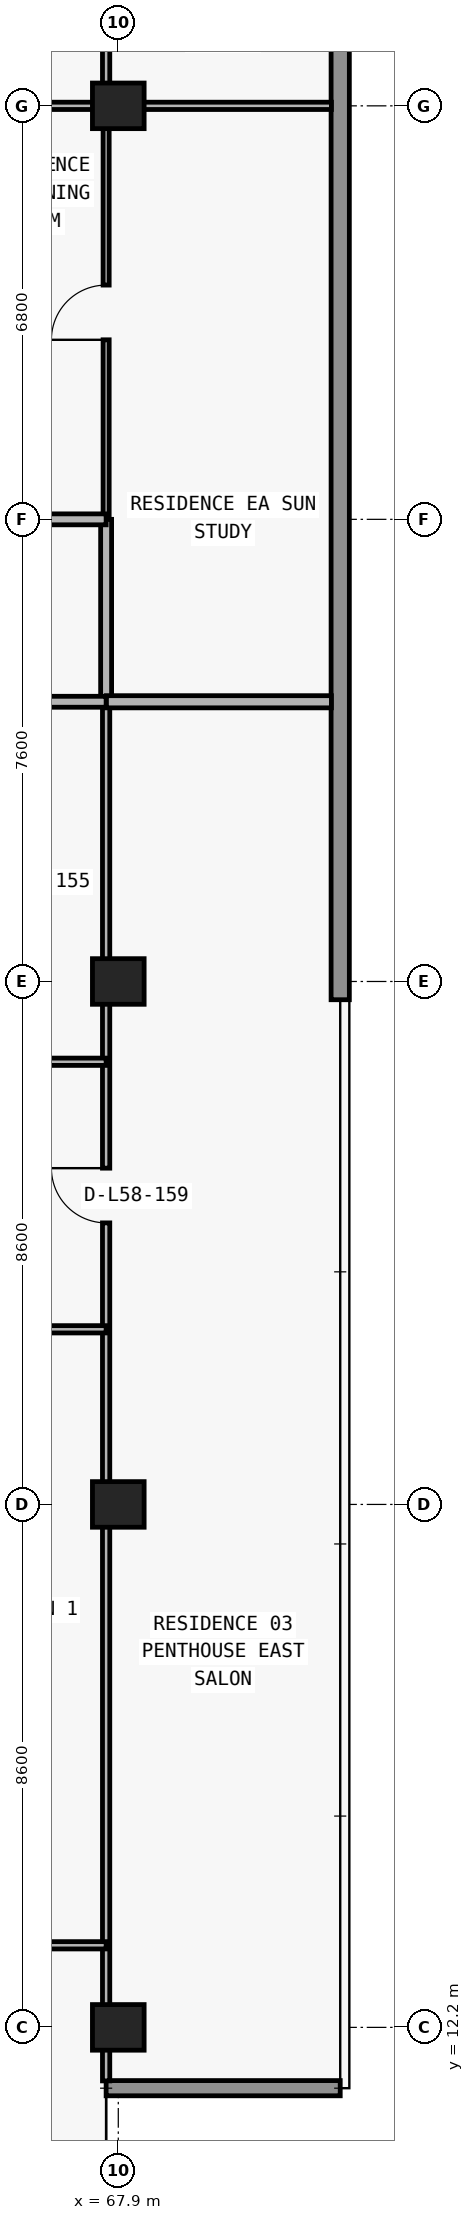
"""IFC4 building model, lengths in metres.
Left out: names, types, materials, properties, quantities, classifications, styles, units other than length and angle.
Written with IfcOpenShell. Run it as: python <this file> out.ifc"""

import sys

from ifc_helpers import new_model, si_unit, direction, frame, frame_2d, origin, origin_2d, place, context, subcontext, project, spatial, rectangle, extrude, element, fill, save


model = new_model("IFC4")
c1 = context("Model", 3, precision=1e-05, world=origin(), true_north=direction((0.0, 1.0)))
c2 = subcontext(c1, "Body", "Model", "MODEL_VIEW")
j1 = project(units=[si_unit("LENGTHUNIT", "METRE"), si_unit("PLANEANGLEUNIT", "RADIAN")], contexts=[c1])
p1 = place(None, origin())
s1 = spatial("IfcSite", under=j1, at=p1, CompositionType="ELEMENT")
p2 = place(p1, origin())
s2 = spatial("IfcBuilding", under=s1, at=p2, CompositionType="ELEMENT")
p3 = place(p2, frame((0.0, 0.0, 208.2)))
s3 = spatial("IfcBuildingStorey", under=s2, at=p3, CompositionType="ELEMENT", Elevation=208.2)
for number, where, z_axis, x_axis in (
    (1, (67.9, 12.2, 0.0), (0.0, 0.0, 1.0), (1.0, 0.0, 0.0)),
    (2, (67.9, 20.8, 0.0), (0.0, 0.0, 1.0), (1.0, 0.0, 0.0)),
    (3, (67.9, 29.4, 0.0), (0.0, 0.0, 1.0), (1.0, 0.0, 0.0)),
    (4, (67.9, 43.8, 0.0), (0.0, 0.0, 1.0), (1.0, 0.0, 0.0)),
):
    element("IfcColumn", number, at=place(p3, frame(where, z_axis=z_axis, x_axis=x_axis)), inside=s3, PredefinedType="COLUMN", context=c2, shape_type="SweptSolid", body=[
        extrude(rectangle(XDim=0.85, YDim=0.75, at=origin_2d()), origin(), (0.0, 0.0, 1.0), 3.05),
    ])
p4 = place(p3, frame((67.7, 11.2, 0.0), z_axis=(0.0, 0.0, 1.0), x_axis=(1.0, 0.0, 0.0)))
e5 = element("IfcWall", 5, at=p4, inside=s3, PredefinedType="ELEMENTEDWALL", context=c2, shape_type="SweptSolid", body=[
    extrude(rectangle(XDim=3.85, YDim=0.25, at=frame_2d((1.925, 0.0))), origin(), (0.0, 0.0, 1.0), 3.05),
])
p5 = place(p3, frame((71.55, 47.0, 0.0), z_axis=(0.0, 0.0, 1.0), x_axis=(0.0, -1.0, 0.0)))
e6 = element("IfcWall", 6, at=p5, inside=s3, PredefinedType="STANDARD", context=c2, shape_type="SweptSolid", body=[
    extrude(rectangle(XDim=17.9, YDim=0.3, at=frame_2d((8.95, 0.0))), origin(), (0.0, 0.0, 1.0), 3.05),
])
p6 = place(p3, frame((67.7, 11.32, 0.0), z_axis=(0.0, 0.0, 1.0), x_axis=(0.0, 1.0, 0.0)))
e7 = element("IfcWall", 7, at=p6, inside=s3, PredefinedType="PARTITIONING", context=c2, shape_type="SweptSolid", body=[
    extrude(rectangle(XDim=22.68, YDim=0.12, at=frame_2d((11.34, 0.0))), origin(), (0.0, 0.0, 1.0), 2.263),
])
p7 = place(p6, frame((14.11, 0.0, 0.0)))
e8 = element("IfcOpeningElement", 8, at=p7, cuts=e7, PredefinedType="OPENING", context=c2, shape_type="SweptSolid", body=[
    extrude(rectangle(XDim=0.9, YDim=2.15, at=frame_2d((0.45, 1.075))), frame((0.0, 0.07, 0.0), z_axis=(0.0, -1.0, 0.0), x_axis=(1.0, 0.0, 0.0)), (0.0, 0.0, 1.0), 0.14),
])
p8 = place(p3, frame((67.7, 34.005, 0.0), z_axis=(0.0, 0.0, 1.0), x_axis=(0.0, 1.0, 0.0)))
e9 = element("IfcWall", 9, at=p8, inside=s3, PredefinedType="PARTITIONING", context=c2, shape_type="SweptSolid", body=[
    extrude(rectangle(XDim=2.995, YDim=0.18, at=frame_2d((1.498, 0.0))), origin(), (0.0, 0.0, 1.0), 2.263),
])
p9 = place(p3, frame((67.7, 37.005, 0.0), z_axis=(0.0, 0.0, 1.0), x_axis=(0.0, 1.0, 0.0)))
e10 = element("IfcWall", 10, at=p9, inside=s3, PredefinedType="MOVABLE", context=c2, shape_type="SweptSolid", body=[
    extrude(rectangle(XDim=6.795, YDim=0.1, at=frame_2d((3.397, 0.0))), origin(), (0.0, 0.0, 1.0), 2.263),
])
p10 = place(p9, frame((2.948, 0.0, 0.0)))
e11 = element("IfcOpeningElement", 11, at=p10, cuts=e10, PredefinedType="OPENING", context=c2, shape_type="SweptSolid", body=[
    extrude(rectangle(XDim=0.9, YDim=2.15, at=frame_2d((0.45, 1.075))), frame((0.0, 0.06, 0.0), z_axis=(0.0, -1.0, 0.0), x_axis=(1.0, 0.0, 0.0)), (0.0, 0.0, 1.0), 0.12),
])
p11 = place(p3, frame((67.7, 43.805, 0.0), z_axis=(0.0, 0.0, 1.0), x_axis=(0.0, 1.0, 0.0)))
e12 = element("IfcWall", 12, at=p11, inside=s3, PredefinedType="PARTITIONING", context=c2, shape_type="SweptSolid", body=[
    extrude(rectangle(XDim=3.075, YDim=0.12, at=frame_2d((1.538, 0.0))), origin(), (0.0, 0.0, 1.0), 3.05),
])
p12 = place(p11, frame((1.087, 0.0, 0.0)))
e13 = element("IfcOpeningElement", 13, at=p12, cuts=e12, PredefinedType="OPENING", context=c2, shape_type="SweptSolid", body=[
    extrude(rectangle(XDim=0.9, YDim=2.15, at=frame_2d((0.45, 1.075))), frame((0.0, 0.07, 0.0), z_axis=(0.0, -1.0, 0.0), x_axis=(1.0, 0.0, 0.0)), (0.0, 0.0, 1.0), 0.14),
])
p13 = place(p3, frame((59.5, 13.55, 0.0), z_axis=(0.0, 0.0, 1.0), x_axis=(1.0, 0.0, 0.0)))
e14 = element("IfcWall", 14, at=p13, inside=s3, PredefinedType="PARTITIONING", context=c2, shape_type="SweptSolid", body=[
    extrude(rectangle(XDim=8.2, YDim=0.12, at=frame_2d((4.1, 0.0))), origin(), (0.0, 0.0, 1.0), 3.05),
])
p14 = place(p13, frame((3.65, 0.0, 0.0)))
e15 = element("IfcOpeningElement", 15, at=p14, cuts=e14, PredefinedType="OPENING", context=c2, shape_type="SweptSolid", body=[
    extrude(rectangle(XDim=0.9, YDim=2.15, at=frame_2d((0.45, 1.075))), frame((0.0, 0.07, 0.0), z_axis=(0.0, -1.0, 0.0), x_axis=(1.0, 0.0, 0.0)), (0.0, 0.0, 1.0), 0.14),
])
p15 = place(p3, frame((59.505, 23.68, 0.0), z_axis=(0.0, 0.0, 1.0), x_axis=(1.0, 0.0, 0.0)))
e16 = element("IfcWall", 16, at=p15, inside=s3, PredefinedType="PARTITIONING", context=c2, shape_type="SweptSolid", body=[
    extrude(rectangle(XDim=8.195, YDim=0.12, at=frame_2d((4.098, 0.0))), origin(), (0.0, 0.0, 1.0), 3.05),
])
p16 = place(p15, frame((3.647, 0.0, 0.0)))
e17 = element("IfcOpeningElement", 17, at=p16, cuts=e16, PredefinedType="OPENING", context=c2, shape_type="SweptSolid", body=[
    extrude(rectangle(XDim=0.9, YDim=2.15, at=frame_2d((0.45, 1.075))), frame((0.0, 0.07, 0.0), z_axis=(0.0, -1.0, 0.0), x_axis=(1.0, 0.0, 0.0)), (0.0, 0.0, 1.0), 0.14),
])
p17 = place(p3, frame((59.5, 28.08, 0.0), z_axis=(0.0, 0.0, 1.0), x_axis=(1.0, 0.0, 0.0)))
e18 = element("IfcWall", 18, at=p17, inside=s3, PredefinedType="PARTITIONING", context=c2, shape_type="SweptSolid", body=[
    extrude(rectangle(XDim=8.2, YDim=0.12, at=frame_2d((4.1, 0.0))), origin(), (0.0, 0.0, 1.0), 3.05),
])
p18 = place(p17, frame((2.839, 0.0, 0.0)))
e19 = element("IfcOpeningElement", 19, at=p18, cuts=e18, PredefinedType="OPENING", context=c2, shape_type="SweptSolid", body=[
    extrude(rectangle(XDim=0.9, YDim=2.15, at=frame_2d((0.45, 1.075))), frame((0.0, 0.07, 0.0), z_axis=(0.0, -1.0, 0.0), x_axis=(1.0, 0.0, 0.0)), (0.0, 0.0, 1.0), 0.14),
])
p19 = place(p3, frame((26.7, 34.0, 0.0), z_axis=(0.0, 0.0, 1.0), x_axis=(1.0, 0.0, 0.0)))
e20 = element("IfcWall", 20, at=p19, inside=s3, PredefinedType="PARTITIONING", context=c2, shape_type="SweptSolid", body=[
    extrude(rectangle(XDim=41.0, YDim=0.18, at=frame_2d((20.5, 0.0))), origin(), (0.0, 0.0, 1.0), 3.05),
])
p20 = place(p19, frame((2.796, 0.0, 0.0)))
e21 = element("IfcOpeningElement", 21, at=p20, cuts=e20, PredefinedType="OPENING", context=c2, shape_type="SweptSolid", body=[
    extrude(rectangle(XDim=1.0, YDim=2.2, at=frame_2d((0.5, 1.1))), frame((0.0, 0.1, 0.0), z_axis=(0.0, -1.0, 0.0), x_axis=(1.0, 0.0, 0.0)), (0.0, 0.0, 1.0), 0.2),
])
p21 = place(p19, frame((27.199, 0.0, 0.0)))
e22 = element("IfcOpeningElement", 22, at=p21, cuts=e20, PredefinedType="OPENING", context=c2, shape_type="SweptSolid", body=[
    extrude(rectangle(XDim=1.0, YDim=2.2, at=frame_2d((0.5, 1.1))), frame((0.0, 0.1, 0.0), z_axis=(0.0, -1.0, 0.0), x_axis=(1.0, 0.0, 0.0)), (0.0, 0.0, 1.0), 0.2),
])
p22 = place(p3, frame((67.705, 34.0, 0.0), z_axis=(0.0, 0.0, 1.0), x_axis=(1.0, 0.0, 0.0)))
e23 = element("IfcWall", 23, at=p22, inside=s3, PredefinedType="PARTITIONING", context=c2, shape_type="SweptSolid", body=[
    extrude(rectangle(XDim=3.7, YDim=0.2, at=frame_2d((1.85, 0.0))), origin(), (0.0, 0.0, 1.0), 3.05),
])
p23 = place(p3, frame((59.855, 37.0, 0.0), z_axis=(0.0, 0.0, 1.0), x_axis=(1.0, 0.0, 0.0)))
e24 = element("IfcWall", 24, at=p23, inside=s3, PredefinedType="PARTITIONING", context=c2, shape_type="SweptSolid", body=[
    extrude(rectangle(XDim=7.845, YDim=0.18, at=frame_2d((3.922, 0.0))), origin(), (0.0, 0.0, 1.0), 3.05),
])
p24 = place(p23, frame((3.349, 0.0, 0.0)))
e25 = element("IfcOpeningElement", 25, at=p24, cuts=e24, PredefinedType="OPENING", context=c2, shape_type="SweptSolid", body=[
    extrude(rectangle(XDim=1.0, YDim=2.2, at=frame_2d((0.5, 1.1))), frame((0.0, 0.1, 0.0), z_axis=(0.0, -1.0, 0.0), x_axis=(1.0, 0.0, 0.0)), (0.0, 0.0, 1.0), 0.2),
])
p25 = place(p3, frame((59.845, 43.8, 0.0), z_axis=(0.0, 0.0, 1.0), x_axis=(1.0, 0.0, 0.0)))
e26 = element("IfcWall", 26, at=p25, inside=s3, PredefinedType="PARTITIONING", context=c2, shape_type="SweptSolid", body=[
    extrude(rectangle(XDim=11.56, YDim=0.12, at=frame_2d((5.78, 0.0))), origin(), (0.0, 0.0, 1.0), 2.418),
])
p26 = place(p25, frame((3.409, 0.0, 0.0)))
e27 = element("IfcOpeningElement", 27, at=p26, cuts=e26, PredefinedType="OPENING", context=c2, shape_type="SweptSolid", body=[
    extrude(rectangle(XDim=0.9, YDim=2.15, at=frame_2d((0.45, 1.075))), frame((0.0, 0.07, 0.0), z_axis=(0.0, -1.0, 0.0), x_axis=(1.0, 0.0, 0.0)), (0.0, 0.0, 1.0), 0.14),
])
p27 = place(p25, frame((0.728, 0.0, 0.0)))
e28 = element("IfcOpeningElement", 28, at=p27, cuts=e26, PredefinedType="OPENING", context=c2, shape_type="SweptSolid", body=[
    extrude(rectangle(XDim=0.85, YDim=2.1, at=frame_2d((0.425, 1.05))), frame((0.0, 0.07, 0.0), z_axis=(0.0, -1.0, 0.0), x_axis=(1.0, 0.0, 0.0)), (0.0, 0.0, 1.0), 0.14),
])
p28 = place(p7, origin())
e29 = element("IfcDoor", 29, at=p28, inside=s3, OperationType="SINGLE_SWING_RIGHT", PredefinedType="DOOR", context=c2, shape_type="SweptSolid", body=[
    extrude(rectangle(XDim=0.9, YDim=2.15, at=frame_2d((0.45, 1.075))), frame((0.0, 0.025, 0.0), z_axis=(0.0, -1.0, 0.0), x_axis=(1.0, 0.0, 0.0)), (0.0, 0.0, 1.0), 0.05),
])
fill(e8, e29)
p29 = place(p10, origin())
e30 = element("IfcDoor", 30, at=p29, inside=s3, OperationType="SINGLE_SWING_LEFT", PredefinedType="DOOR", context=c2, shape_type="SweptSolid", body=[
    extrude(rectangle(XDim=0.9, YDim=2.15, at=frame_2d((0.45, 1.075))), frame((0.0, 0.025, 0.0), z_axis=(0.0, -1.0, 0.0), x_axis=(1.0, 0.0, 0.0)), (0.0, 0.0, 1.0), 0.05),
])
fill(e11, e30)
save(model, sys.argv[1])
